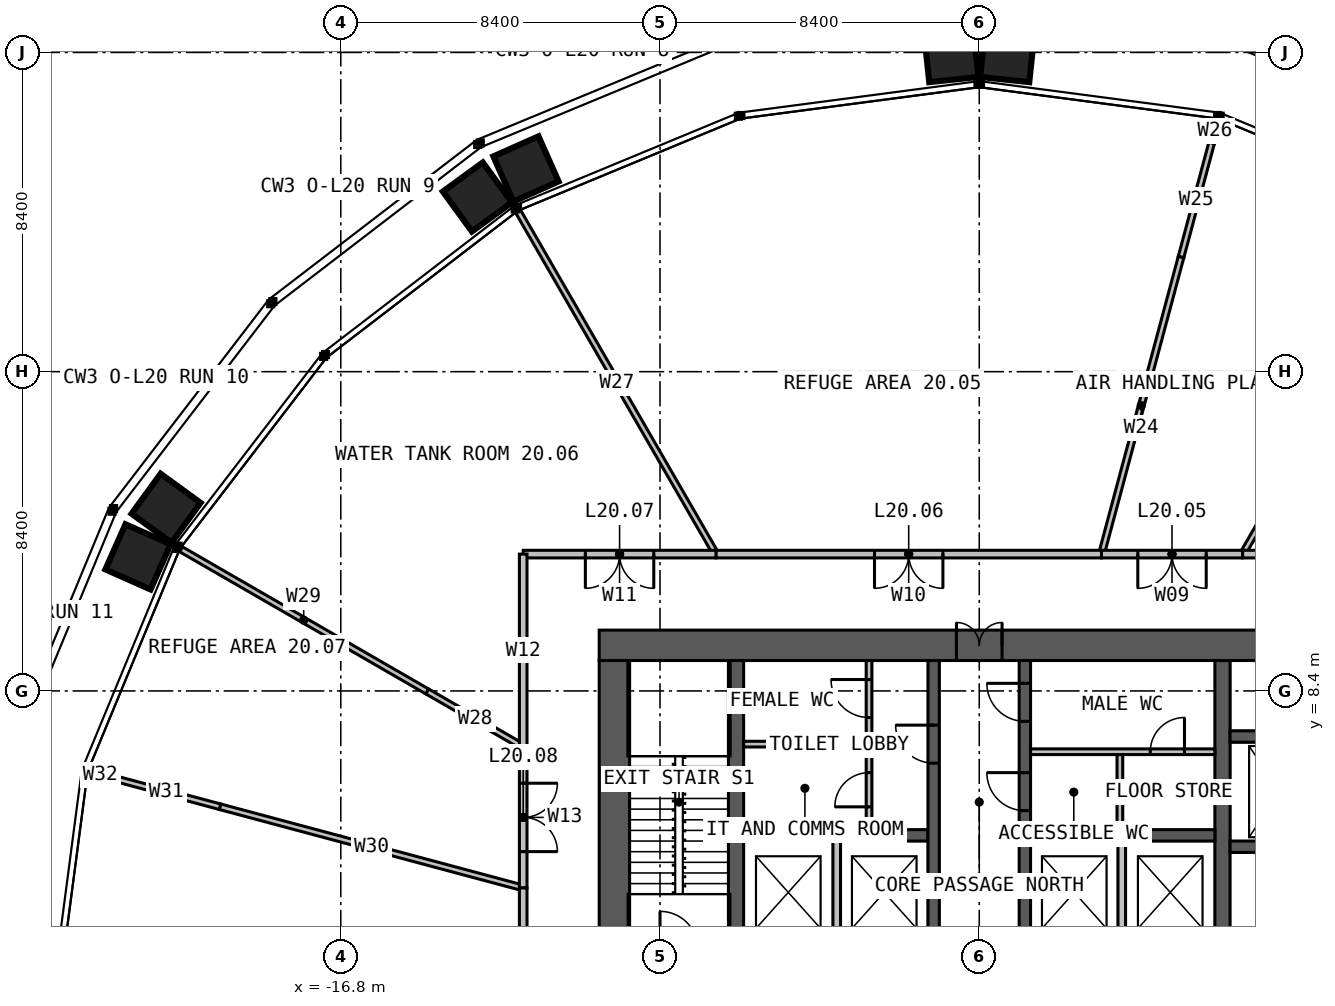
"""IFC4 building model, lengths in metres.
Left out: names, types, materials, properties, quantities, classifications, styles, units other than length and angle.
Written with IfcOpenShell. Run it as: python <this file> out.ifc"""

import sys

from ifc_helpers import new_model, si_unit, direction, frame, frame_2d, origin, place, context, subcontext, project, spatial, rectangle, extrude, element, fill, save


model = new_model("IFC4")
c1 = context("Model", 3, precision=1e-05, world=origin(), true_north=direction((0.0, 1.0)))
c2 = subcontext(c1, "Body", "Model", "MODEL_VIEW")
j1 = project(units=[si_unit("LENGTHUNIT", "METRE"), si_unit("PLANEANGLEUNIT", "RADIAN")], contexts=[c1])
p1 = place(None, origin())
s1 = spatial("IfcSite", under=j1, at=p1, CompositionType="ELEMENT")
p2 = place(p1, origin())
s2 = spatial("IfcBuilding", under=s1, at=p2, CompositionType="ELEMENT")
p3 = place(p2, frame((0.0, 0.0, 85.0)))
s3 = spatial("IfcBuildingStorey", under=s2, at=p3, CompositionType="ELEMENT", Elevation=85.0)
p4 = place(p3, frame((-10.0, 9.6, 0.0), z_axis=(0.0, 0.0, 1.0), x_axis=(1.0, 0.0, 0.0)))
e1 = element("IfcWall", 1, at=p4, inside=s3, PredefinedType="SOLIDWALL", context=c2, shape_type="SweptSolid", body=[
    extrude(rectangle(XDim=20.0, YDim=0.8, at=frame_2d((10.0, 0.0))), origin(), (0.0, 0.0, 1.0), 5.0),
])
p5 = place(p4, frame((9.4, 0.0, 0.0)))
e2 = element("IfcOpeningElement", 2, at=p5, cuts=e1, PredefinedType="OPENING", context=c2, shape_type="SweptSolid", body=[
    extrude(rectangle(XDim=1.2, YDim=2.2, at=frame_2d((0.6, 1.1))), frame((0.0, 0.41, 0.0), z_axis=(0.0, -1.0, 0.0), x_axis=(1.0, 0.0, 0.0)), (0.0, 0.0, 1.0), 0.82),
])
p6 = place(p3, frame((-9.6, 9.2, 0.0), z_axis=(0.0, 0.0, 1.0), x_axis=(0.0, -1.0, 0.0)))
e3 = element("IfcWall", 3, at=p6, inside=s3, PredefinedType="SOLIDWALL", context=c2, shape_type="SweptSolid", body=[
    extrude(rectangle(XDim=18.4, YDim=0.8, at=frame_2d((9.2, 0.0))), origin(), (0.0, 0.0, 1.0), 5.0),
])
p7 = place(p3, frame((-6.4, -9.2, 0.0), z_axis=(0.0, 0.0, 1.0), x_axis=(0.0, 1.0, 0.0)))
e4 = element("IfcWall", 4, at=p7, inside=s3, PredefinedType="SOLIDWALL", context=c2, shape_type="SweptSolid", body=[
    extrude(rectangle(XDim=18.4, YDim=0.4, at=frame_2d((9.2, 0.0))), origin(), (0.0, 0.0, 1.0), 5.0),
])
p8 = place(p7, frame((8.7, 0.0, 0.0)))
e5 = element("IfcOpeningElement", 5, at=p8, cuts=e4, PredefinedType="OPENING", context=c2, shape_type="SweptSolid", body=[
    extrude(rectangle(XDim=1.0, YDim=2.2, at=frame_2d((0.5, 1.1))), frame((0.0, 0.21, 0.0), z_axis=(0.0, -1.0, 0.0), x_axis=(1.0, 0.0, 0.0)), (0.0, 0.0, 1.0), 0.42),
])
p9 = place(p3, frame((6.4, 9.2, 0.0), z_axis=(0.0, 0.0, 1.0), x_axis=(0.0, -1.0, 0.0)))
e6 = element("IfcWall", 6, at=p9, inside=s3, PredefinedType="SOLIDWALL", context=c2, shape_type="SweptSolid", body=[
    extrude(rectangle(XDim=18.4, YDim=0.4, at=frame_2d((9.2, 0.0))), origin(), (0.0, 0.0, 1.0), 5.0),
])
p10 = place(p9, frame((8.7, 0.0, 0.0)))
e7 = element("IfcOpeningElement", 7, at=p10, cuts=e6, PredefinedType="OPENING", context=c2, shape_type="SweptSolid", body=[
    extrude(rectangle(XDim=1.0, YDim=2.2, at=frame_2d((0.5, 1.1))), frame((0.0, 0.21, 0.0), z_axis=(0.0, -1.0, 0.0), x_axis=(1.0, 0.0, 0.0)), (0.0, 0.0, 1.0), 0.42),
])
for number, where, z_axis, x_axis in (
    (8, (-6.2, 4.6, 0.0), (0.0, 0.0, 1.0), (1.0, 0.0, 0.0)),
    (9, (1.35, 4.6, 0.0), (0.0, 0.0, 1.0), (1.0, 0.0, 0.0)),
):
    element("IfcWall", number, at=place(p3, frame(where, z_axis=z_axis, x_axis=x_axis)), inside=s3, PredefinedType="SOLIDWALL", context=c2, shape_type="SweptSolid", body=[
        extrude(rectangle(XDim=4.85, YDim=0.3, at=frame_2d((2.425, 0.0))), origin(), (0.0, 0.0, 1.0), 5.0),
    ])
p11 = place(p3, frame((-1.2, 1.45, 0.0), z_axis=(0.0, 0.0, 1.0), x_axis=(0.0, 1.0, 0.0)))
e10 = element("IfcWall", 10, at=p11, inside=s3, PredefinedType="SOLIDWALL", context=c2, shape_type="SweptSolid", body=[
    extrude(rectangle(XDim=7.75, YDim=0.3, at=frame_2d((3.875, 0.0))), origin(), (0.0, 0.0, 1.0), 5.0),
])
p12 = place(p11, frame((5.05, 0.0, 0.0)))
e11 = element("IfcOpeningElement", 11, at=p12, cuts=e10, PredefinedType="OPENING", context=c2, shape_type="SweptSolid", body=[
    extrude(rectangle(XDim=1.0, YDim=2.2, at=frame_2d((0.5, 1.1))), frame((0.0, 0.16, 0.0), z_axis=(0.0, -1.0, 0.0), x_axis=(1.0, 0.0, 0.0)), (0.0, 0.0, 1.0), 0.32),
])
p13 = place(p3, frame((1.2, 1.45, 0.0), z_axis=(0.0, 0.0, 1.0), x_axis=(0.0, 1.0, 0.0)))
e12 = element("IfcWall", 12, at=p13, inside=s3, PredefinedType="SOLIDWALL", context=c2, shape_type="SweptSolid", body=[
    extrude(rectangle(XDim=7.75, YDim=0.3, at=frame_2d((3.875, 0.0))), origin(), (0.0, 0.0, 1.0), 5.0),
])
p14 = place(p13, frame((3.8, 0.0, 0.0)))
e13 = element("IfcOpeningElement", 13, at=p14, cuts=e12, PredefinedType="OPENING", context=c2, shape_type="SweptSolid", body=[
    extrude(rectangle(XDim=1.0, YDim=2.2, at=frame_2d((0.5, 1.1))), frame((0.0, 0.16, 0.0), z_axis=(0.0, -1.0, 0.0), x_axis=(1.0, 0.0, 0.0)), (0.0, 0.0, 1.0), 0.32),
])
p15 = place(p13, frame((6.15, 0.0, 0.0)))
e14 = element("IfcOpeningElement", 14, at=p15, cuts=e12, PredefinedType="OPENING", context=c2, shape_type="SweptSolid", body=[
    extrude(rectangle(XDim=1.0, YDim=2.2, at=frame_2d((0.5, 1.1))), frame((0.0, 0.16, 0.0), z_axis=(0.0, -1.0, 0.0), x_axis=(1.0, 0.0, 0.0)), (0.0, 0.0, 1.0), 0.32),
])
p16 = place(p3, frame((6.6, 4.3, 0.0), z_axis=(0.0, 0.0, 1.0), x_axis=(1.0, 0.0, 0.0)))
e15 = element("IfcWall", 15, at=p16, inside=s3, PredefinedType="SOLIDWALL", context=c2, shape_type="SweptSolid", body=[
    extrude(rectangle(XDim=2.6, YDim=0.3, at=frame_2d((1.3, 0.0))), origin(), (0.0, 0.0, 1.0), 5.0),
])
p17 = place(p16, frame((0.75, 0.0, 0.0)))
e16 = element("IfcOpeningElement", 16, at=p17, cuts=e15, PredefinedType="OPENING", context=c2, shape_type="SweptSolid", body=[
    extrude(rectangle(XDim=1.1, YDim=2.2, at=frame_2d((0.55, 1.1))), frame((0.0, 0.16, 0.0), z_axis=(0.0, -1.0, 0.0), x_axis=(1.0, 0.0, 0.0)), (0.0, 0.0, 1.0), 0.32),
])
p18 = place(p3, frame((6.6, 7.2, 0.0), z_axis=(0.0, 0.0, 1.0), x_axis=(1.0, 0.0, 0.0)))
e17 = element("IfcWall", 17, at=p18, inside=s3, PredefinedType="SOLIDWALL", context=c2, shape_type="SweptSolid", body=[
    extrude(rectangle(XDim=2.6, YDim=0.3, at=frame_2d((1.3, 0.0))), origin(), (0.0, 0.0, 1.0), 5.0),
])
for number, where, z_axis, x_axis in (
    (18, (-3.75, 1.75, 0.0), (0.0, 0.0, 1.0), (0.0, 1.0, 0.0)),
    (19, (3.75, 1.75, 0.0), (0.0, 0.0, 1.0), (0.0, 1.0, 0.0)),
):
    element("IfcWall", number, at=place(p3, frame(where, z_axis=z_axis, x_axis=x_axis)), inside=s3, PredefinedType="SOLIDWALL", context=c2, shape_type="SweptSolid", body=[
        extrude(rectangle(XDim=2.7, YDim=0.2, at=frame_2d((1.35, 0.0))), origin(), (0.0, 0.0, 1.0), 4.75),
    ])
p19 = place(p3, frame((1.35, 6.8, 0.0), z_axis=(0.0, 0.0, 1.0), x_axis=(1.0, 0.0, 0.0)))
e20 = element("IfcWall", 20, at=p19, inside=s3, PredefinedType="PARTITIONING", context=c2, shape_type="SweptSolid", body=[
    extrude(rectangle(XDim=4.85, YDim=0.15, at=frame_2d((2.425, 0.0))), origin(), (0.0, 0.0, 1.0), 4.75),
])
p20 = place(p19, frame((3.15, 0.0, 0.0)))
e21 = element("IfcOpeningElement", 21, at=p20, cuts=e20, PredefinedType="OPENING", context=c2, shape_type="SweptSolid", body=[
    extrude(rectangle(XDim=0.9, YDim=2.2, at=frame_2d((0.45, 1.1))), frame((0.0, 0.085, 0.0), z_axis=(0.0, -1.0, 0.0), x_axis=(1.0, 0.0, 0.0)), (0.0, 0.0, 1.0), 0.17),
])
p21 = place(p3, frame((3.7, 4.75, 0.0), z_axis=(0.0, 0.0, 1.0), x_axis=(0.0, 1.0, 0.0)))
e22 = element("IfcWall", 22, at=p21, inside=s3, PredefinedType="PARTITIONING", context=c2, shape_type="SweptSolid", body=[
    extrude(rectangle(XDim=1.975, YDim=0.15, at=frame_2d((0.988, 0.0))), origin(), (0.0, 0.0, 1.0), 4.75),
])
p22 = place(p3, frame((-2.9, 4.75, 0.0), z_axis=(0.0, 0.0, 1.0), x_axis=(0.0, 1.0, 0.0)))
e23 = element("IfcWall", 23, at=p22, inside=s3, PredefinedType="PARTITIONING", context=c2, shape_type="SweptSolid", body=[
    extrude(rectangle(XDim=4.45, YDim=0.15, at=frame_2d((2.225, 0.0))), origin(), (0.0, 0.0, 1.0), 4.75),
])
p23 = place(p22, frame((2.95, 0.0, 0.0)))
e24 = element("IfcOpeningElement", 24, at=p23, cuts=e23, PredefinedType="OPENING", context=c2, shape_type="SweptSolid", body=[
    extrude(rectangle(XDim=1.0, YDim=2.2, at=frame_2d((0.5, 1.1))), frame((0.0, 0.085, 0.0), z_axis=(0.0, -1.0, 0.0), x_axis=(1.0, 0.0, 0.0)), (0.0, 0.0, 1.0), 0.17),
])
p24 = place(p22, frame((0.6, 0.0, 0.0)))
e25 = element("IfcOpeningElement", 25, at=p24, cuts=e23, PredefinedType="OPENING", context=c2, shape_type="SweptSolid", body=[
    extrude(rectangle(XDim=0.9, YDim=2.2, at=frame_2d((0.45, 1.1))), frame((0.0, 0.085, 0.0), z_axis=(0.0, -1.0, 0.0), x_axis=(1.0, 0.0, 0.0)), (0.0, 0.0, 1.0), 0.17),
])
p25 = place(p3, frame((-6.2, 7.0, 0.0), z_axis=(0.0, 0.0, 1.0), x_axis=(1.0, 0.0, 0.0)))
e26 = element("IfcWall", 26, at=p25, inside=s3, PredefinedType="PARTITIONING", context=c2, shape_type="SweptSolid", body=[
    extrude(rectangle(XDim=3.225, YDim=0.15, at=frame_2d((1.612, 0.0))), origin(), (0.0, 0.0, 1.0), 4.75),
])
p26 = place(p3, frame((6.928, 12.0, 0.0), z_axis=(0.0, 0.0, 1.0), x_axis=(0.500005074639, 0.86602247392, 0.0)))
e27 = element("IfcWall", 27, at=p26, inside=s3, PredefinedType="PARTITIONING", context=c2, shape_type="SweptSolid", body=[
    extrude(rectangle(XDim=10.419, YDim=0.15, at=frame_2d((5.209, 0.0))), origin(), (0.0, 0.0, 1.0), 4.8),
])
p27 = place(p3, frame((3.215, 12.0, 0.0), z_axis=(0.0, 0.0, 1.0), x_axis=(0.258830053586, 0.965922876508, 0.0)))
e28 = element("IfcWall", 28, at=p27, inside=s3, PredefinedType="PARTITIONING", context=c2, shape_type="SweptSolid", body=[
    extrude(rectangle(XDim=8.095, YDim=0.15, at=frame_2d((4.047, 0.0))), origin(), (0.0, 0.0, 1.0), 4.8),
])
p28 = place(p3, frame((5.311, 19.819, 0.0), z_axis=(0.0, 0.0, 1.0), x_axis=(0.258835525839, 0.965921410138, 0.0)))
e29 = element("IfcWall", 29, at=p28, inside=s3, PredefinedType="PARTITIONING", context=c2, shape_type="SweptSolid", body=[
    extrude(rectangle(XDim=3.109, YDim=0.15, at=frame_2d((1.554, 0.0))), origin(), (0.0, 0.0, 1.0), 3.79),
])
p29 = place(p3, frame((6.115, 22.822, 0.0), z_axis=(0.0, 0.0, 1.0), x_axis=(0.258811407408, 0.965927872771, 0.0)))
e30 = element("IfcWall", 30, at=p29, inside=s3, PredefinedType="PARTITIONING", context=c2, shape_type="SweptSolid", body=[
    extrude(rectangle(XDim=0.648, YDim=0.15, at=frame_2d((0.324, 0.0))), origin(), (0.0, 0.0, 1.0), 4.8),
])
p30 = place(p3, frame((-6.928, 12.0, 0.0), z_axis=(0.0, 0.0, 1.0), x_axis=(-0.500005074639, 0.86602247392, 0.0)))
e31 = element("IfcWall", 31, at=p30, inside=s3, PredefinedType="PARTITIONING", context=c2, shape_type="SweptSolid", body=[
    extrude(rectangle(XDim=10.419, YDim=0.15, at=frame_2d((5.209, 0.0))), origin(), (0.0, 0.0, 1.0), 4.8),
])
p31 = place(p3, frame((-12.0, 6.928, 0.0), z_axis=(0.0, 0.0, 1.0), x_axis=(-0.866026830048, 0.499997529631, 0.0)))
e32 = element("IfcWall", 32, at=p31, inside=s3, PredefinedType="PARTITIONING", context=c2, shape_type="SweptSolid", body=[
    extrude(rectangle(XDim=2.919, YDim=0.15, at=frame_2d((1.46, 0.0))), origin(), (0.0, 0.0, 1.0), 3.79),
])
p32 = place(p3, frame((-14.528, 8.388, 0.0), z_axis=(0.0, 0.0, 1.0), x_axis=(-0.8660207781, 0.500008011835, 0.0)))
e33 = element("IfcWall", 33, at=p32, inside=s3, PredefinedType="PARTITIONING", context=c2, shape_type="SweptSolid", body=[
    extrude(rectangle(XDim=7.5, YDim=0.15, at=frame_2d((3.75, 0.0))), origin(), (0.0, 0.0, 1.0), 4.8),
])
p33 = place(p3, frame((-12.0, 3.215, 0.0), z_axis=(0.0, 0.0, 1.0), x_axis=(-0.965926149295, 0.258817839624, 0.0)))
e34 = element("IfcWall", 34, at=p33, inside=s3, PredefinedType="PARTITIONING", context=c2, shape_type="SweptSolid", body=[
    extrude(rectangle(XDim=8.26, YDim=0.15, at=frame_2d((4.13, 0.0))), origin(), (0.0, 0.0, 1.0), 4.8),
])
p34 = place(p3, frame((-19.978, 5.353, 0.0), z_axis=(0.0, 0.0, 1.0), x_axis=(-0.965910471853, 0.258876341839, 0.0)))
e35 = element("IfcWall", 35, at=p34, inside=s3, PredefinedType="PARTITIONING", context=c2, shape_type="SweptSolid", body=[
    extrude(rectangle(XDim=2.929, YDim=0.15, at=frame_2d((1.465, 0.0))), origin(), (0.0, 0.0, 1.0), 3.79),
])
p35 = place(p3, frame((-22.807, 6.111, 0.0), z_axis=(0.0, 0.0, 1.0), x_axis=(-0.965934907189, 0.258785152345, 0.0)))
e36 = element("IfcWall", 36, at=p35, inside=s3, PredefinedType="PARTITIONING", context=c2, shape_type="SweptSolid", body=[
    extrude(rectangle(XDim=0.663, YDim=0.15, at=frame_2d((0.332, 0.0))), origin(), (0.0, 0.0, 1.0), 4.8),
])
p36 = place(p3, frame((12.0, 12.0, 0.0), z_axis=(0.0, 0.0, 1.0), x_axis=(-1.0, 0.0, 0.0)))
e37 = element("IfcWall", 37, at=p36, inside=s3, PredefinedType="PARTITIONING", context=c2, shape_type="SweptSolid", body=[
    extrude(rectangle(XDim=5.072, YDim=0.2, at=frame_2d((2.536, 0.0))), origin(), (0.0, 0.0, 1.0), 4.8),
])
p37 = place(p36, frame((1.636, 0.0, 0.0)))
e38 = element("IfcOpeningElement", 38, at=p37, cuts=e37, PredefinedType="OPENING", context=c2, shape_type="SweptSolid", body=[
    extrude(rectangle(XDim=1.8, YDim=2.2, at=frame_2d((0.9, 1.1))), frame((0.0, 0.11, 0.0), z_axis=(0.0, -1.0, 0.0), x_axis=(1.0, 0.0, 0.0)), (0.0, 0.0, 1.0), 0.22),
])
p38 = place(p3, frame((6.928, 12.0, 0.0), z_axis=(0.0, 0.0, 1.0), x_axis=(-1.0, 0.0, 0.0)))
e39 = element("IfcWall", 39, at=p38, inside=s3, PredefinedType="PARTITIONING", context=c2, shape_type="SweptSolid", body=[
    extrude(rectangle(XDim=3.713, YDim=0.2, at=frame_2d((1.856, 0.0))), origin(), (0.0, 0.0, 1.0), 4.8),
])
p39 = place(p38, frame((0.956, 0.0, 0.0)))
e40 = element("IfcOpeningElement", 40, at=p39, cuts=e39, PredefinedType="OPENING", context=c2, shape_type="SweptSolid", body=[
    extrude(rectangle(XDim=1.8, YDim=2.2, at=frame_2d((0.9, 1.1))), frame((0.0, 0.11, 0.0), z_axis=(0.0, -1.0, 0.0), x_axis=(1.0, 0.0, 0.0)), (0.0, 0.0, 1.0), 0.22),
])
p40 = place(p3, frame((3.215, 12.0, 0.0), z_axis=(0.0, 0.0, 1.0), x_axis=(-1.0, 0.0, 0.0)))
e41 = element("IfcWall", 41, at=p40, inside=s3, PredefinedType="PARTITIONING", context=c2, shape_type="SweptSolid", body=[
    extrude(rectangle(XDim=10.144, YDim=0.2, at=frame_2d((5.072, 0.0))), origin(), (0.0, 0.0, 1.0), 4.8),
])
p41 = place(p40, frame((4.172, 0.0, 0.0)))
e42 = element("IfcOpeningElement", 42, at=p41, cuts=e41, PredefinedType="OPENING", context=c2, shape_type="SweptSolid", body=[
    extrude(rectangle(XDim=1.8, YDim=2.2, at=frame_2d((0.9, 1.1))), frame((0.0, 0.11, 0.0), z_axis=(0.0, -1.0, 0.0), x_axis=(1.0, 0.0, 0.0)), (0.0, 0.0, 1.0), 0.22),
])
p42 = place(p3, frame((-6.928, 12.0, 0.0), z_axis=(0.0, 0.0, 1.0), x_axis=(-1.0, 0.0, 0.0)))
e43 = element("IfcWall", 43, at=p42, inside=s3, PredefinedType="PARTITIONING", context=c2, shape_type="SweptSolid", body=[
    extrude(rectangle(XDim=5.072, YDim=0.2, at=frame_2d((2.536, 0.0))), origin(), (0.0, 0.0, 1.0), 4.8),
])
p43 = place(p42, frame((1.636, 0.0, 0.0)))
e44 = element("IfcOpeningElement", 44, at=p43, cuts=e43, PredefinedType="OPENING", context=c2, shape_type="SweptSolid", body=[
    extrude(rectangle(XDim=1.8, YDim=2.2, at=frame_2d((0.9, 1.1))), frame((0.0, 0.11, 0.0), z_axis=(0.0, -1.0, 0.0), x_axis=(1.0, 0.0, 0.0)), (0.0, 0.0, 1.0), 0.22),
])
p44 = place(p3, frame((-12.0, 12.0, 0.0), z_axis=(0.0, 0.0, 1.0), x_axis=(0.0, -1.0, 0.0)))
e45 = element("IfcWall", 45, at=p44, inside=s3, PredefinedType="PARTITIONING", context=c2, shape_type="SweptSolid", body=[
    extrude(rectangle(XDim=5.072, YDim=0.2, at=frame_2d((2.536, 0.0))), origin(), (0.0, 0.0, 1.0), 4.8),
])
p45 = place(p3, frame((-12.0, 6.928, 0.0), z_axis=(0.0, 0.0, 1.0), x_axis=(0.0, -1.0, 0.0)))
e46 = element("IfcWall", 46, at=p45, inside=s3, PredefinedType="PARTITIONING", context=c2, shape_type="SweptSolid", body=[
    extrude(rectangle(XDim=3.713, YDim=0.2, at=frame_2d((1.856, 0.0))), origin(), (0.0, 0.0, 1.0), 4.8),
])
p46 = place(p45, frame((0.956, 0.0, 0.0)))
e47 = element("IfcOpeningElement", 47, at=p46, cuts=e46, PredefinedType="OPENING", context=c2, shape_type="SweptSolid", body=[
    extrude(rectangle(XDim=1.8, YDim=2.2, at=frame_2d((0.9, 1.1))), frame((0.0, 0.11, 0.0), z_axis=(0.0, -1.0, 0.0), x_axis=(1.0, 0.0, 0.0)), (0.0, 0.0, 1.0), 0.22),
])
p47 = place(p3, frame((-12.0, 3.215, 0.0), z_axis=(0.0, 0.0, 1.0), x_axis=(0.0, -1.0, 0.0)))
e48 = element("IfcWall", 48, at=p47, inside=s3, PredefinedType="PARTITIONING", context=c2, shape_type="SweptSolid", body=[
    extrude(rectangle(XDim=10.144, YDim=0.2, at=frame_2d((5.072, 0.0))), origin(), (0.0, 0.0, 1.0), 4.8),
])
p48 = place(p47, frame((4.172, 0.0, 0.0)))
e49 = element("IfcOpeningElement", 49, at=p48, cuts=e48, PredefinedType="OPENING", context=c2, shape_type="SweptSolid", body=[
    extrude(rectangle(XDim=1.8, YDim=2.2, at=frame_2d((0.9, 1.1))), frame((0.0, 0.11, 0.0), z_axis=(0.0, -1.0, 0.0), x_axis=(1.0, 0.0, 0.0)), (0.0, 0.0, 1.0), 0.22),
])
p49 = place(p5, origin())
e50 = element("IfcDoor", 50, at=p49, inside=s3, OperationType="DOUBLE_DOOR_SINGLE_SWING", PredefinedType="DOOR", context=c2, shape_type="SweptSolid", body=[
    extrude(rectangle(XDim=1.2, YDim=2.2, at=frame_2d((0.6, 1.1))), frame((0.0, 0.025, 0.0), z_axis=(0.0, -1.0, 0.0), x_axis=(1.0, 0.0, 0.0)), (0.0, 0.0, 1.0), 0.05),
])
fill(e2, e50)
p50 = place(p12, origin())
e51 = element("IfcDoor", 51, at=p50, inside=s3, OperationType="SINGLE_SWING_RIGHT", PredefinedType="DOOR", context=c2, shape_type="SweptSolid", body=[
    extrude(rectangle(XDim=1.0, YDim=2.2, at=frame_2d((0.5, 1.1))), frame((0.0, 0.025, 0.0), z_axis=(0.0, -1.0, 0.0), x_axis=(1.0, 0.0, 0.0)), (0.0, 0.0, 1.0), 0.05),
])
fill(e11, e51)
p51 = place(p14, origin())
e52 = element("IfcDoor", 52, at=p51, inside=s3, OperationType="SINGLE_SWING_RIGHT", PredefinedType="DOOR", context=c2, shape_type="SweptSolid", body=[
    extrude(rectangle(XDim=1.0, YDim=2.2, at=frame_2d((0.5, 1.1))), frame((0.0, 0.025, 0.0), z_axis=(0.0, -1.0, 0.0), x_axis=(1.0, 0.0, 0.0)), (0.0, 0.0, 1.0), 0.05),
])
fill(e13, e52)
p52 = place(p15, origin())
e53 = element("IfcDoor", 53, at=p52, inside=s3, OperationType="SINGLE_SWING_RIGHT", PredefinedType="DOOR", context=c2, shape_type="SweptSolid", body=[
    extrude(rectangle(XDim=1.0, YDim=2.2, at=frame_2d((0.5, 1.1))), frame((0.0, 0.025, 0.0), z_axis=(0.0, -1.0, 0.0), x_axis=(1.0, 0.0, 0.0)), (0.0, 0.0, 1.0), 0.05),
])
fill(e14, e53)
p53 = place(p20, origin())
e54 = element("IfcDoor", 54, at=p53, inside=s3, OperationType="SINGLE_SWING_RIGHT", PredefinedType="DOOR", context=c2, shape_type="SweptSolid", body=[
    extrude(rectangle(XDim=0.9, YDim=2.2, at=frame_2d((0.45, 1.1))), frame((0.0, 0.025, 0.0), z_axis=(0.0, -1.0, 0.0), x_axis=(1.0, 0.0, 0.0)), (0.0, 0.0, 1.0), 0.05),
])
fill(e21, e54)
p54 = place(p23, origin())
e55 = element("IfcDoor", 55, at=p54, inside=s3, OperationType="SINGLE_SWING_RIGHT", PredefinedType="DOOR", context=c2, shape_type="SweptSolid", body=[
    extrude(rectangle(XDim=1.0, YDim=2.2, at=frame_2d((0.5, 1.1))), frame((0.0, 0.025, 0.0), z_axis=(0.0, -1.0, 0.0), x_axis=(1.0, 0.0, 0.0)), (0.0, 0.0, 1.0), 0.05),
])
fill(e24, e55)
p55 = place(p24, origin())
e56 = element("IfcDoor", 56, at=p55, inside=s3, OperationType="SINGLE_SWING_LEFT", PredefinedType="DOOR", context=c2, shape_type="SweptSolid", body=[
    extrude(rectangle(XDim=0.9, YDim=2.2, at=frame_2d((0.45, 1.1))), frame((0.0, 0.025, 0.0), z_axis=(0.0, -1.0, 0.0), x_axis=(1.0, 0.0, 0.0)), (0.0, 0.0, 1.0), 0.05),
])
fill(e25, e56)
p56 = place(p39, origin())
e57 = element("IfcDoor", 57, at=p56, inside=s3, OperationType="DOUBLE_DOOR_SINGLE_SWING", PredefinedType="DOOR", context=c2, shape_type="SweptSolid", body=[
    extrude(rectangle(XDim=1.8, YDim=2.2, at=frame_2d((0.9, 1.1))), frame((0.0, 0.025, 0.0), z_axis=(0.0, -1.0, 0.0), x_axis=(1.0, 0.0, 0.0)), (0.0, 0.0, 1.0), 0.05),
])
fill(e40, e57)
p57 = place(p41, origin())
e58 = element("IfcDoor", 58, at=p57, inside=s3, OperationType="DOUBLE_DOOR_SINGLE_SWING", PredefinedType="DOOR", context=c2, shape_type="SweptSolid", body=[
    extrude(rectangle(XDim=1.8, YDim=2.2, at=frame_2d((0.9, 1.1))), frame((0.0, 0.025, 0.0), z_axis=(0.0, -1.0, 0.0), x_axis=(1.0, 0.0, 0.0)), (0.0, 0.0, 1.0), 0.05),
])
fill(e42, e58)
p58 = place(p43, origin())
e59 = element("IfcDoor", 59, at=p58, inside=s3, OperationType="DOUBLE_DOOR_SINGLE_SWING", PredefinedType="DOOR", context=c2, shape_type="SweptSolid", body=[
    extrude(rectangle(XDim=1.8, YDim=2.2, at=frame_2d((0.9, 1.1))), frame((0.0, 0.025, 0.0), z_axis=(0.0, -1.0, 0.0), x_axis=(1.0, 0.0, 0.0)), (0.0, 0.0, 1.0), 0.05),
])
fill(e44, e59)
p59 = place(p46, origin())
e60 = element("IfcDoor", 60, at=p59, inside=s3, OperationType="DOUBLE_DOOR_SINGLE_SWING", PredefinedType="DOOR", context=c2, shape_type="SweptSolid", body=[
    extrude(rectangle(XDim=1.8, YDim=2.2, at=frame_2d((0.9, 1.1))), frame((0.0, 0.025, 0.0), z_axis=(0.0, -1.0, 0.0), x_axis=(1.0, 0.0, 0.0)), (0.0, 0.0, 1.0), 0.05),
])
fill(e47, e60)
save(model, sys.argv[1])
